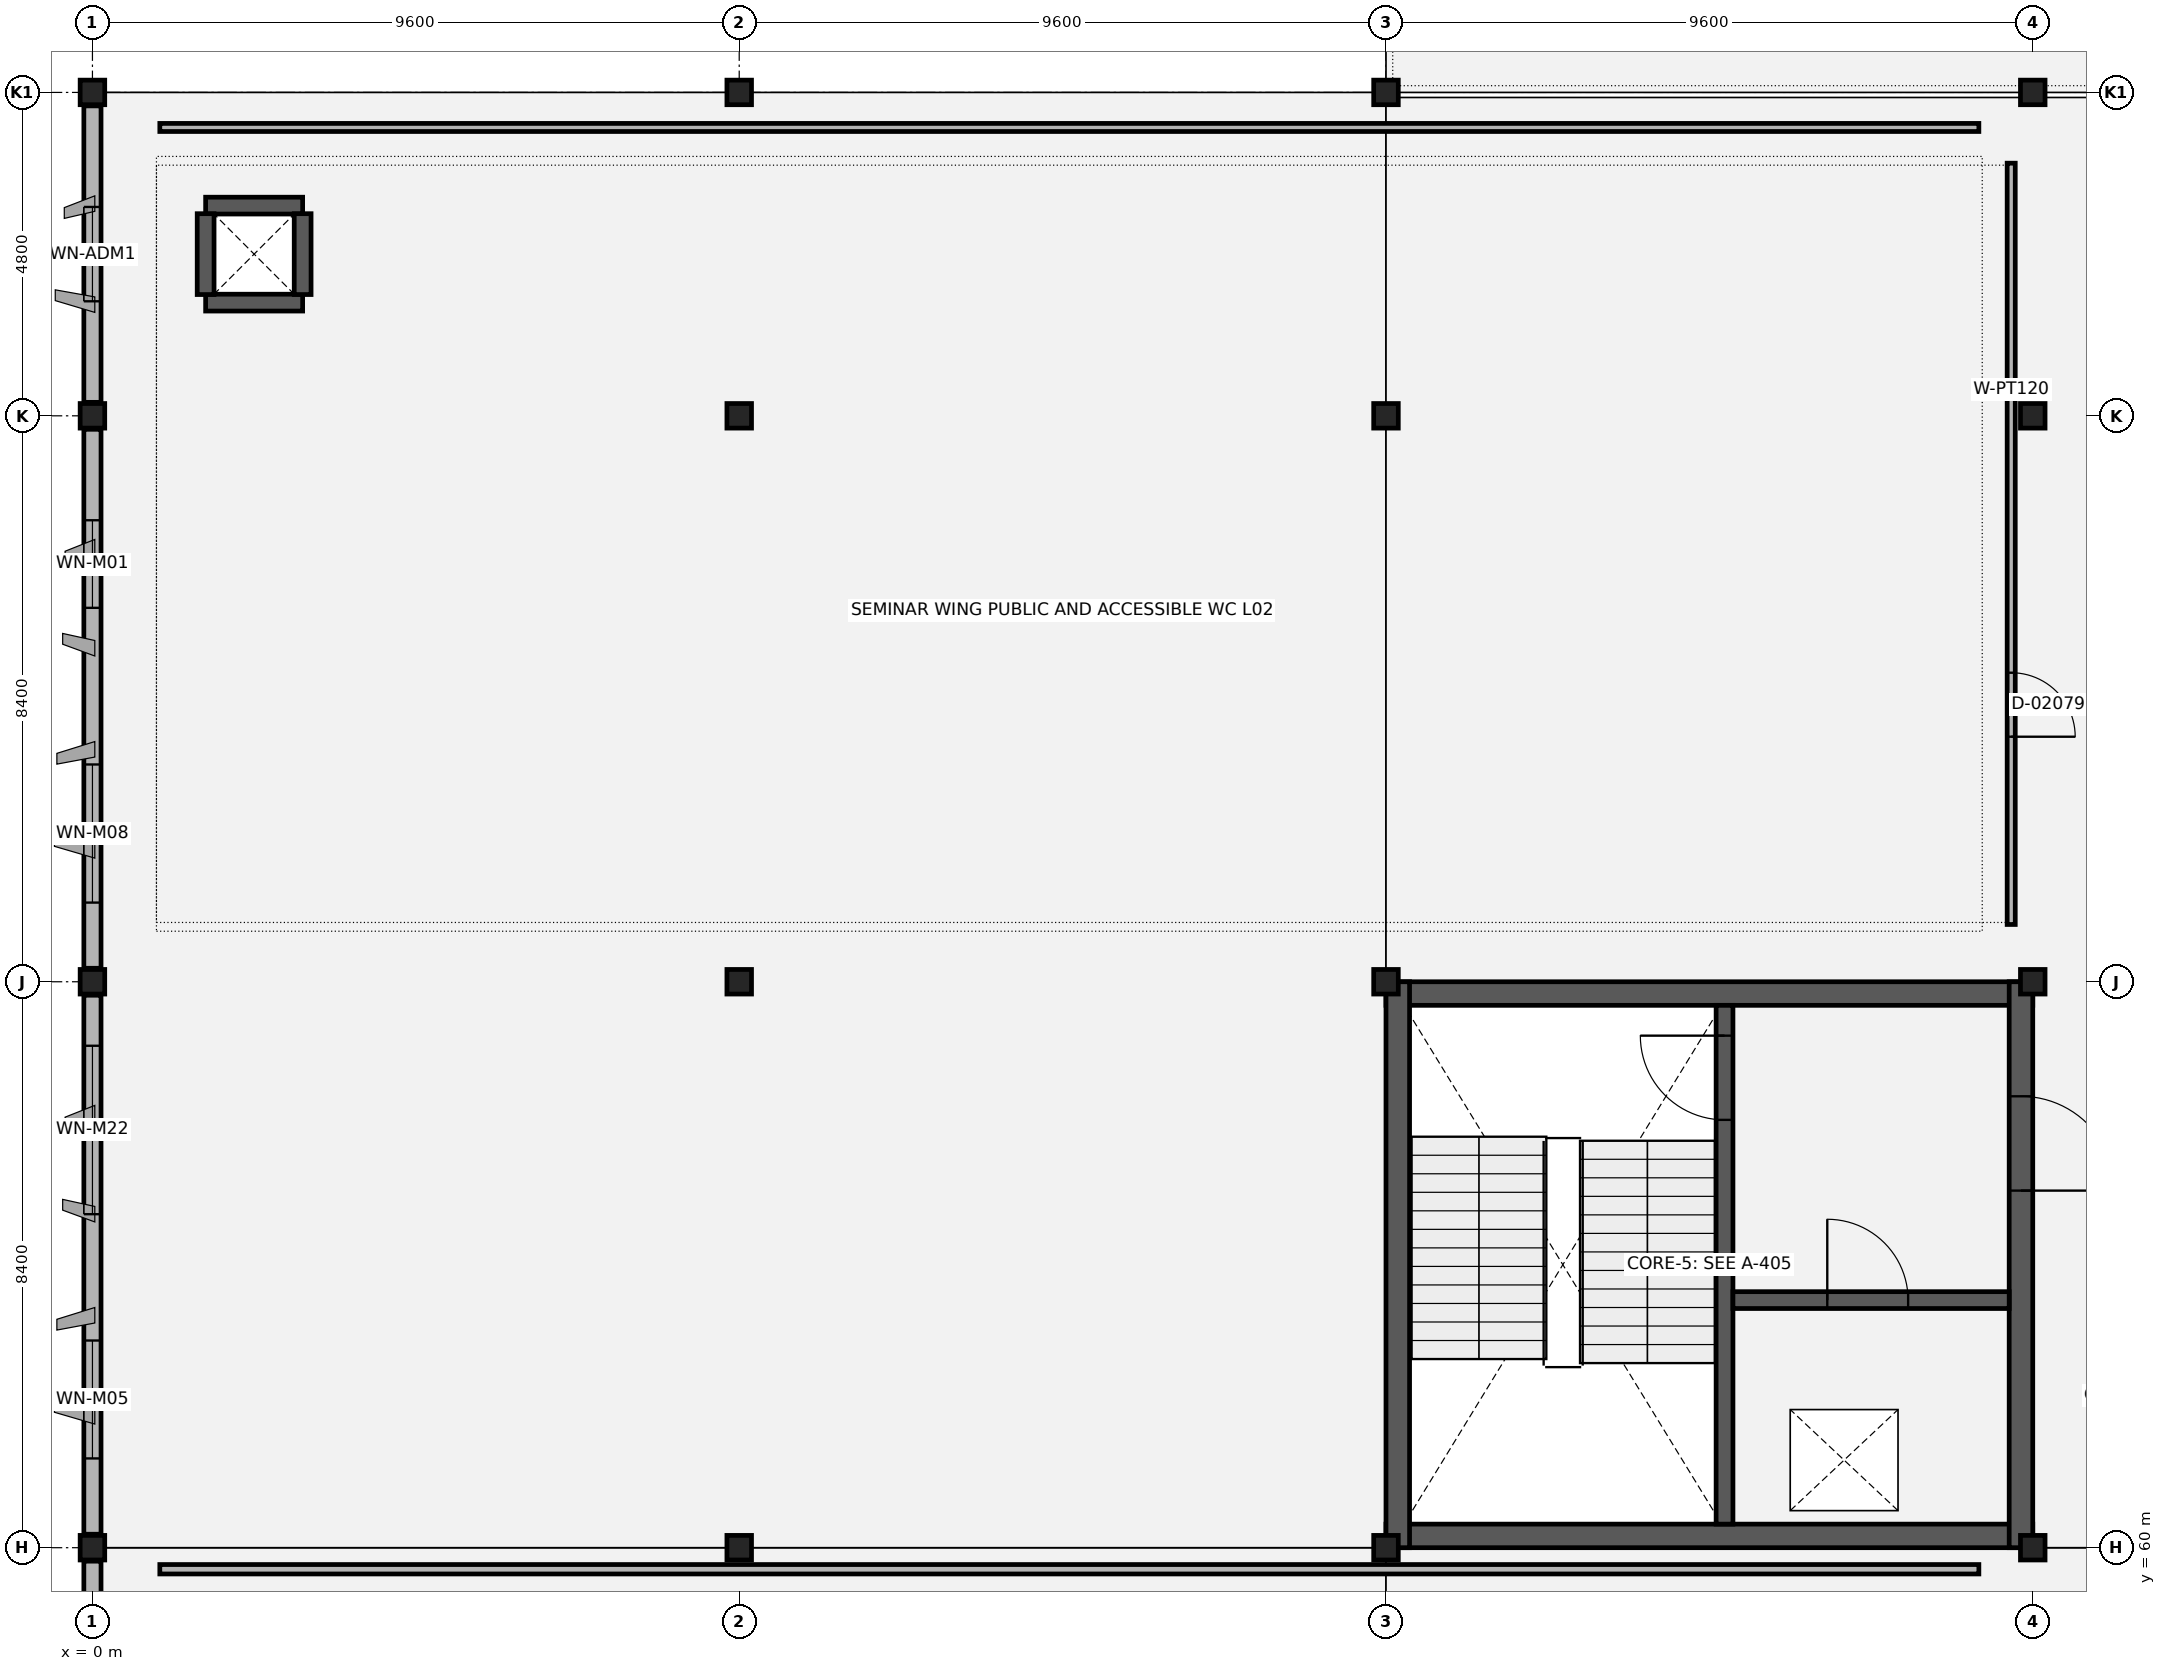
"""IFC4 building model, lengths in metres.
Left out: names, types, materials, properties, quantities, classifications, styles, units other than length and angle.
Written with IfcOpenShell. Run it as: python <this file> out.ifc"""

import sys

from ifc_helpers import new_model, si_unit, direction, frame, frame_2d, origin, origin_2d, place, context, subcontext, project, spatial, rectangle, extrude, element, fill, save


model = new_model("IFC4")
c1 = context("Model", 3, precision=1e-05, world=origin(), true_north=direction((0.0, 1.0)))
c2 = subcontext(c1, "Body", "Model", "MODEL_VIEW")
j1 = project(units=[si_unit("LENGTHUNIT", "METRE"), si_unit("PLANEANGLEUNIT", "RADIAN")], contexts=[c1])
p1 = place(None, origin())
s1 = spatial("IfcSite", under=j1, at=p1, CompositionType="ELEMENT")
p2 = place(p1, origin())
s2 = spatial("IfcBuilding", under=s1, at=p2, CompositionType="ELEMENT")
p3 = place(p2, frame((0.0, 0.0, 10.2)))
s3 = spatial("IfcBuildingStorey", under=s2, at=p3, CompositionType="ELEMENT", Elevation=10.2)
for number, where, z_axis, x_axis in (
    (1, (0.0, 60.0, 0.0), (0.0, 0.0, 1.0), (1.0, 0.0, 0.0)),
    (2, (0.0, 68.4, 0.0), (0.0, 0.0, 1.0), (1.0, 0.0, 0.0)),
    (3, (0.0, 76.8, 0.0), (0.0, 0.0, 1.0), (1.0, 0.0, 0.0)),
    (4, (0.0, 81.6, 0.0), (0.0, 0.0, 1.0), (1.0, 0.0, 0.0)),
    (5, (9.6, 60.0, 0.0), (0.0, 0.0, 1.0), (1.0, 0.0, 0.0)),
    (6, (9.6, 68.4, 0.0), (0.0, 0.0, 1.0), (1.0, 0.0, 0.0)),
    (7, (9.6, 76.8, 0.0), (0.0, 0.0, 1.0), (1.0, 0.0, 0.0)),
    (8, (9.6, 81.6, 0.0), (0.0, 0.0, 1.0), (1.0, 0.0, 0.0)),
    (9, (19.2, 60.0, 0.0), (0.0, 0.0, 1.0), (1.0, 0.0, 0.0)),
    (10, (19.2, 68.4, 0.0), (0.0, 0.0, 1.0), (1.0, 0.0, 0.0)),
    (11, (19.2, 76.8, 0.0), (0.0, 0.0, 1.0), (1.0, 0.0, 0.0)),
    (12, (19.2, 81.6, 0.0), (0.0, 0.0, 1.0), (1.0, 0.0, 0.0)),
    (13, (28.8, 60.0, 0.0), (0.0, 0.0, 1.0), (1.0, 0.0, 0.0)),
    (14, (28.8, 68.4, 0.0), (0.0, 0.0, 1.0), (1.0, 0.0, 0.0)),
    (15, (28.8, 76.8, 0.0), (0.0, 0.0, 1.0), (1.0, 0.0, 0.0)),
    (16, (28.8, 81.6, 0.0), (0.0, 0.0, 1.0), (1.0, 0.0, 0.0)),
):
    element("IfcColumn", number, at=place(p3, frame(where, z_axis=z_axis, x_axis=x_axis)), inside=s3, PredefinedType="COLUMN", context=c2, shape_type="SweptSolid", body=[
        extrude(rectangle(XDim=0.365, YDim=0.365, at=origin_2d()), origin(), (0.0, 0.0, 1.0), 4.2),
    ])
for number, where, z_axis, x_axis in (
    (17, (1.68, 78.48, 0.0), (0.0, 0.0, 1.0), (1.0, 0.0, 0.0)),
    (18, (1.68, 79.92, 0.0), (0.0, 0.0, 1.0), (1.0, 0.0, 0.0)),
):
    element("IfcWall", number, at=place(p3, frame(where, z_axis=z_axis, x_axis=x_axis)), inside=s3, PredefinedType="SHEAR", context=c2, shape_type="SweptSolid", body=[
        extrude(rectangle(XDim=1.44, YDim=0.25, at=frame_2d((0.72, 0.0))), origin(), (0.0, 0.0, 1.0), 3.1),
    ])
for number, where, z_axis, x_axis in (
    (19, (1.68, 78.6, 0.0), (0.0, 0.0, 1.0), (0.0, 1.0, 0.0)),
    (20, (3.12, 78.6, 0.0), (0.0, 0.0, 1.0), (0.0, 1.0, 0.0)),
):
    element("IfcWall", number, at=place(p3, frame(where, z_axis=z_axis, x_axis=x_axis)), inside=s3, PredefinedType="SHEAR", context=c2, shape_type="SweptSolid", body=[
        extrude(rectangle(XDim=1.2, YDim=0.25, at=frame_2d((0.6, 0.0))), origin(), (0.0, 0.0, 1.0), 3.1),
    ])
p4 = place(p3, frame((0.0, 59.8, 0.0), z_axis=(0.0, 0.0, 1.0), x_axis=(0.0, -1.0, 0.0)))
e21 = element("IfcWall", 21, at=p4, inside=s3, PredefinedType="SOLIDWALL", context=c2, shape_type="SweptSolid", body=[
    extrude(rectangle(XDim=8.0, YDim=0.255, at=frame_2d((4.0, 0.0))), origin(), (0.0, 0.0, 1.0), 3.05),
])
p5 = place(p4, frame((1.15, 0.0, 0.9)))
e22 = element("IfcOpeningElement", 22, at=p5, cuts=e21, PredefinedType="OPENING", context=c2, shape_type="SweptSolid", body=[
    extrude(rectangle(XDim=1.7, YDim=1.45, at=frame_2d((0.85, 0.725))), frame((0.0, 0.137, 0.0), z_axis=(0.0, -1.0, 0.0), x_axis=(1.0, 0.0, 0.0)), (0.0, 0.0, 1.0), 0.275),
])
p6 = place(p4, frame((5.275, 0.0, 0.9)))
e23 = element("IfcOpeningElement", 23, at=p6, cuts=e21, PredefinedType="OPENING", context=c2, shape_type="SweptSolid", body=[
    extrude(rectangle(XDim=1.45, YDim=1.45, at=frame_2d((0.725, 0.725))), frame((0.0, 0.137, 0.0), z_axis=(0.0, -1.0, 0.0), x_axis=(1.0, 0.0, 0.0)), (0.0, 0.0, 1.0), 0.275),
])
p7 = place(p3, frame((0.0, 68.2, 0.0), z_axis=(0.0, 0.0, 1.0), x_axis=(0.0, -1.0, 0.0)))
e24 = element("IfcWall", 24, at=p7, inside=s3, PredefinedType="SOLIDWALL", context=c2, shape_type="SweptSolid", body=[
    extrude(rectangle(XDim=8.0, YDim=0.255, at=frame_2d((4.0, 0.0))), origin(), (0.0, 0.0, 1.0), 3.05),
])
p8 = place(p7, frame((0.75, 0.0, 0.9)))
e25 = element("IfcOpeningElement", 25, at=p8, cuts=e24, PredefinedType="OPENING", context=c2, shape_type="SweptSolid", body=[
    extrude(rectangle(XDim=2.5, YDim=1.65, at=frame_2d((1.25, 0.825))), frame((0.0, 0.137, 0.0), z_axis=(0.0, -1.0, 0.0), x_axis=(1.0, 0.0, 0.0)), (0.0, 0.0, 1.0), 0.275),
])
p9 = place(p7, frame((5.125, 0.0, 0.9)))
e26 = element("IfcOpeningElement", 26, at=p9, cuts=e24, PredefinedType="OPENING", context=c2, shape_type="SweptSolid", body=[
    extrude(rectangle(XDim=1.75, YDim=1.55, at=frame_2d((0.875, 0.775))), frame((0.0, 0.137, 0.0), z_axis=(0.0, -1.0, 0.0), x_axis=(1.0, 0.0, 0.0)), (0.0, 0.0, 1.0), 0.275),
])
p10 = place(p3, frame((0.0, 76.6, 0.0), z_axis=(0.0, 0.0, 1.0), x_axis=(0.0, -1.0, 0.0)))
e27 = element("IfcWall", 27, at=p10, inside=s3, PredefinedType="SOLIDWALL", context=c2, shape_type="SweptSolid", body=[
    extrude(rectangle(XDim=8.0, YDim=0.255, at=frame_2d((4.0, 0.0))), origin(), (0.0, 0.0, 1.0), 3.05),
])
p11 = place(p10, frame((1.35, 0.0, 0.9)))
e28 = element("IfcOpeningElement", 28, at=p11, cuts=e27, PredefinedType="OPENING", context=c2, shape_type="SweptSolid", body=[
    extrude(rectangle(XDim=1.3, YDim=1.4, at=frame_2d((0.65, 0.7))), frame((0.0, 0.137, 0.0), z_axis=(0.0, -1.0, 0.0), x_axis=(1.0, 0.0, 0.0)), (0.0, 0.0, 1.0), 0.275),
])
p12 = place(p10, frame((4.975, 0.0, 0.9)))
e29 = element("IfcOpeningElement", 29, at=p12, cuts=e27, PredefinedType="OPENING", context=c2, shape_type="SweptSolid", body=[
    extrude(rectangle(XDim=2.05, YDim=1.6, at=frame_2d((1.025, 0.8))), frame((0.0, 0.137, 0.0), z_axis=(0.0, -1.0, 0.0), x_axis=(1.0, 0.0, 0.0)), (0.0, 0.0, 1.0), 0.275),
])
p13 = place(p3, frame((0.0, 81.4, 0.0), z_axis=(0.0, 0.0, 1.0), x_axis=(0.0, -1.0, 0.0)))
e30 = element("IfcWall", 30, at=p13, inside=s3, PredefinedType="SOLIDWALL", context=c2, shape_type="SweptSolid", body=[
    extrude(rectangle(XDim=4.4, YDim=0.255, at=frame_2d((2.2, 0.0))), origin(), (0.0, 0.0, 1.0), 3.05),
])
p14 = place(p13, frame((1.5, 0.0, 0.9)))
e31 = element("IfcOpeningElement", 31, at=p14, cuts=e30, PredefinedType="OPENING", context=c2, shape_type="SweptSolid", body=[
    extrude(rectangle(XDim=1.4, YDim=1.4, at=frame_2d((0.7, 0.7))), frame((0.0, 0.137, 0.0), z_axis=(0.0, -1.0, 0.0), x_axis=(1.0, 0.0, 0.0)), (0.0, 0.0, 1.0), 0.275),
])
for number, where, z_axis, x_axis in (
    (32, (19.2, 68.225, 0.0), (0.0, 0.0, 1.0), (1.0, 0.0, 0.0)),
    (33, (19.2, 60.175, 0.0), (0.0, 0.0, 1.0), (1.0, 0.0, 0.0)),
):
    element("IfcWall", number, at=place(p3, frame(where, z_axis=z_axis, x_axis=x_axis)), inside=s3, PredefinedType="SHEAR", context=c2, shape_type="SweptSolid", body=[
        extrude(rectangle(XDim=9.6, YDim=0.35, at=frame_2d((4.8, 0.0))), origin(), (0.0, 0.0, 1.0), 3.95),
    ])
p15 = place(p3, frame((19.375, 60.0, 0.0), z_axis=(0.0, 0.0, 1.0), x_axis=(0.0, 1.0, 0.0)))
e34 = element("IfcWall", 34, at=p15, inside=s3, PredefinedType="SHEAR", context=c2, shape_type="SweptSolid", body=[
    extrude(rectangle(XDim=8.4, YDim=0.35, at=frame_2d((4.2, 0.0))), origin(), (0.0, 0.0, 1.0), 3.95),
])
p16 = place(p3, frame((28.625, 60.0, 0.0), z_axis=(0.0, 0.0, 1.0), x_axis=(0.0, 1.0, 0.0)))
e35 = element("IfcWall", 35, at=p16, inside=s3, PredefinedType="SHEAR", context=c2, shape_type="SweptSolid", body=[
    extrude(rectangle(XDim=8.4, YDim=0.35, at=frame_2d((4.2, 0.0))), origin(), (0.0, 0.0, 1.0), 3.95),
])
p17 = place(p16, frame((5.3, 0.0, 0.0)))
e36 = element("IfcOpeningElement", 36, at=p17, cuts=e35, PredefinedType="OPENING", context=c2, shape_type="SweptSolid", body=[
    extrude(rectangle(XDim=1.4, YDim=2.15, at=frame_2d((0.7, 1.075))), frame((0.0, 0.185, 0.0), z_axis=(0.0, -1.0, 0.0), x_axis=(1.0, 0.0, 0.0)), (0.0, 0.0, 1.0), 0.37),
])
p18 = place(p3, frame((24.225, 68.05, 0.0), z_axis=(0.0, 0.0, 1.0), x_axis=(0.0, -1.0, 0.0)))
e37 = element("IfcWall", 37, at=p18, inside=s3, PredefinedType="SHEAR", context=c2, shape_type="SweptSolid", body=[
    extrude(rectangle(XDim=7.7, YDim=0.25, at=frame_2d((3.85, 0.0))), origin(), (0.0, 0.0, 1.0), 3.95),
])
p19 = place(p18, frame((0.45, 0.0, 0.0)))
e38 = element("IfcOpeningElement", 38, at=p19, cuts=e37, PredefinedType="OPENING", context=c2, shape_type="SweptSolid", body=[
    extrude(rectangle(XDim=1.25, YDim=2.15, at=frame_2d((0.625, 1.075))), frame((0.0, 0.135, 0.0), z_axis=(0.0, -1.0, 0.0), x_axis=(1.0, 0.0, 0.0)), (0.0, 0.0, 1.0), 0.27),
])
p20 = place(p3, frame((24.35, 63.675, 0.0), z_axis=(0.0, 0.0, 1.0), x_axis=(1.0, 0.0, 0.0)))
e39 = element("IfcWall", 39, at=p20, inside=s3, PredefinedType="SHEAR", context=c2, shape_type="SweptSolid", body=[
    extrude(rectangle(XDim=4.1, YDim=0.25, at=frame_2d((2.05, 0.0))), origin(), (0.0, 0.0, 1.0), 3.95),
])
p21 = place(p20, frame((1.4, 0.0, 0.0)))
e40 = element("IfcOpeningElement", 40, at=p21, cuts=e39, PredefinedType="OPENING", context=c2, shape_type="SweptSolid", body=[
    extrude(rectangle(XDim=1.2, YDim=2.15, at=frame_2d((0.6, 1.075))), frame((0.0, 0.135, 0.0), z_axis=(0.0, -1.0, 0.0), x_axis=(1.0, 0.0, 0.0)), (0.0, 0.0, 1.0), 0.27),
])
p22 = place(p3, frame((1.0, 59.68, 0.0), z_axis=(0.0, 0.0, 1.0), x_axis=(1.0, 0.0, 0.0)))
e41 = element("IfcWall", 41, at=p22, inside=s3, PredefinedType="PARTITIONING", context=c2, shape_type="SweptSolid", body=[
    extrude(rectangle(XDim=27.0, YDim=0.14, at=frame_2d((13.5, 0.0))), origin(), (0.0, 0.0, 1.0), 3.03),
])
p23 = place(p3, frame((28.48, 69.25, 0.0), z_axis=(0.0, 0.0, 1.0), x_axis=(0.0, 1.0, 0.0)))
e42 = element("IfcWall", 42, at=p23, inside=s3, PredefinedType="PARTITIONING", context=c2, shape_type="SweptSolid", body=[
    extrude(rectangle(XDim=11.3, YDim=0.12, at=frame_2d((5.65, 0.0))), origin(), (0.0, 0.0, 1.0), 3.03),
])
p24 = place(p23, frame((2.787, 0.0, 0.0)))
e43 = element("IfcOpeningElement", 43, at=p24, cuts=e42, PredefinedType="OPENING", context=c2, shape_type="SweptSolid", body=[
    extrude(rectangle(XDim=0.95, YDim=2.1, at=frame_2d((0.475, 1.05))), frame((0.0, 0.07, 0.0), z_axis=(0.0, -1.0, 0.0), x_axis=(1.0, 0.0, 0.0)), (0.0, 0.0, 1.0), 0.14),
])
p25 = place(p3, frame((1.0, 81.08, 0.0), z_axis=(0.0, 0.0, 1.0), x_axis=(1.0, 0.0, 0.0)))
e44 = element("IfcWall", 44, at=p25, inside=s3, PredefinedType="PARTITIONING", context=c2, shape_type="SweptSolid", body=[
    extrude(rectangle(XDim=27.0, YDim=0.12, at=frame_2d((13.5, 0.0))), origin(), (0.0, 0.0, 1.0), 3.03),
])
p26 = place(p8, origin())
e45 = element("IfcWindow", 45, at=p26, inside=s3, PartitioningType="SINGLE_PANEL", PredefinedType="WINDOW", context=c2, shape_type="SweptSolid", body=[
    extrude(rectangle(XDim=2.5, YDim=1.65, at=frame_2d((1.25, 0.825))), frame((0.0, 0.03, 0.0), z_axis=(0.0, -1.0, 0.0), x_axis=(1.0, 0.0, 0.0)), (0.0, 0.0, 1.0), 0.06),
])
fill(e25, e45)
p27 = place(p9, origin())
e46 = element("IfcWindow", 46, at=p27, inside=s3, PartitioningType="SINGLE_PANEL", PredefinedType="WINDOW", context=c2, shape_type="SweptSolid", body=[
    extrude(rectangle(XDim=1.75, YDim=1.55, at=frame_2d((0.875, 0.775))), frame((0.0, 0.03, 0.0), z_axis=(0.0, -1.0, 0.0), x_axis=(1.0, 0.0, 0.0)), (0.0, 0.0, 1.0), 0.06),
])
fill(e26, e46)
p28 = place(p11, origin())
e47 = element("IfcWindow", 47, at=p28, inside=s3, PartitioningType="SINGLE_PANEL", PredefinedType="WINDOW", context=c2, shape_type="SweptSolid", body=[
    extrude(rectangle(XDim=1.3, YDim=1.4, at=frame_2d((0.65, 0.7))), frame((0.0, 0.03, 0.0), z_axis=(0.0, -1.0, 0.0), x_axis=(1.0, 0.0, 0.0)), (0.0, 0.0, 1.0), 0.06),
])
fill(e28, e47)
p29 = place(p12, origin())
e48 = element("IfcWindow", 48, at=p29, inside=s3, PartitioningType="SINGLE_PANEL", PredefinedType="WINDOW", context=c2, shape_type="SweptSolid", body=[
    extrude(rectangle(XDim=2.05, YDim=1.6, at=frame_2d((1.025, 0.8))), frame((0.0, 0.03, 0.0), z_axis=(0.0, -1.0, 0.0), x_axis=(1.0, 0.0, 0.0)), (0.0, 0.0, 1.0), 0.06),
])
fill(e29, e48)
p30 = place(p14, origin())
e49 = element("IfcWindow", 49, at=p30, inside=s3, PartitioningType="SINGLE_PANEL", PredefinedType="WINDOW", context=c2, shape_type="SweptSolid", body=[
    extrude(rectangle(XDim=1.4, YDim=1.4, at=frame_2d((0.7, 0.7))), frame((0.0, 0.03, 0.0), z_axis=(0.0, -1.0, 0.0), x_axis=(1.0, 0.0, 0.0)), (0.0, 0.0, 1.0), 0.06),
])
fill(e31, e49)
p31 = place(p19, origin())
e50 = element("IfcDoor", 50, at=p31, inside=s3, OperationType="SINGLE_SWING_RIGHT", PredefinedType="DOOR", context=c2, shape_type="SweptSolid", body=[
    extrude(rectangle(XDim=1.25, YDim=2.15, at=frame_2d((0.625, 1.075))), frame((0.0, 0.025, 0.0), z_axis=(0.0, -1.0, 0.0), x_axis=(1.0, 0.0, 0.0)), (0.0, 0.0, 1.0), 0.05),
])
fill(e38, e50)
p32 = place(p21, origin())
e51 = element("IfcDoor", 51, at=p32, inside=s3, OperationType="SINGLE_SWING_LEFT", PredefinedType="DOOR", context=c2, shape_type="SweptSolid", body=[
    extrude(rectangle(XDim=1.2, YDim=2.15, at=frame_2d((0.6, 1.075))), frame((0.0, 0.025, 0.0), z_axis=(0.0, -1.0, 0.0), x_axis=(1.0, 0.0, 0.0)), (0.0, 0.0, 1.0), 0.05),
])
fill(e40, e51)
p33 = place(p17, origin())
e52 = element("IfcDoor", 52, at=p33, inside=s3, OperationType="SINGLE_SWING_RIGHT", PredefinedType="DOOR", context=c2, shape_type="SweptSolid", body=[
    extrude(rectangle(XDim=1.4, YDim=2.15, at=frame_2d((0.7, 1.075))), frame((0.0, 0.025, 0.0), z_axis=(0.0, -1.0, 0.0), x_axis=(1.0, 0.0, 0.0)), (0.0, 0.0, 1.0), 0.05),
])
fill(e36, e52)
p34 = place(p24, origin())
e53 = element("IfcDoor", 53, at=p34, inside=s3, OperationType="SINGLE_SWING_RIGHT", PredefinedType="DOOR", context=c2, shape_type="SweptSolid", body=[
    extrude(rectangle(XDim=0.95, YDim=2.1, at=frame_2d((0.475, 1.05))), frame((0.0, 0.025, 0.0), z_axis=(0.0, -1.0, 0.0), x_axis=(1.0, 0.0, 0.0)), (0.0, 0.0, 1.0), 0.05),
])
fill(e43, e53)
save(model, sys.argv[1])
